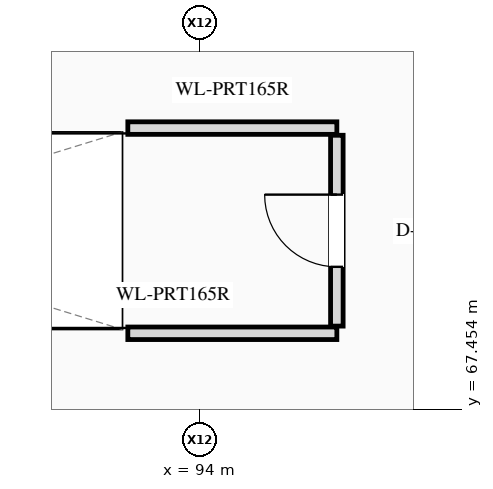
"""IFC4 building model, lengths in metres.
Left out: names, types, materials, properties, quantities, classifications, styles, units other than length and angle.
Written with IfcOpenShell. Run it as: python <this file> out.ifc"""

import sys

from ifc_helpers import new_model, si_unit, direction, frame, frame_2d, origin, place, context, subcontext, project, spatial, rectangle, extrude, element, fill, save


model = new_model("IFC4")
c1 = context("Model", 3, precision=1e-05, world=origin(), true_north=direction((0.0, 1.0)))
c2 = subcontext(c1, "Body", "Model", "MODEL_VIEW")
j1 = project(units=[si_unit("LENGTHUNIT", "METRE"), si_unit("PLANEANGLEUNIT", "RADIAN")], contexts=[c1])
p1 = place(None, origin())
s1 = spatial("IfcSite", under=j1, at=p1, CompositionType="ELEMENT")
p2 = place(p1, origin())
s2 = spatial("IfcBuilding", under=s1, at=p2, CompositionType="ELEMENT")
p3 = place(p2, frame((0.0, 0.0, 15.6)))
s3 = spatial("IfcBuildingStorey", under=s2, at=p3, CompositionType="ELEMENT", Elevation=15.6)
for number, where, z_axis, x_axis in (
    (1, (93.05, 68.45, 0.0), (0.0, 0.0, 1.0), (1.0, 0.0, 0.0)),
    (2, (93.05, 71.15, 0.0), (0.0, 0.0, 1.0), (1.0, 0.0, 0.0)),
):
    element("IfcWall", number, at=place(p3, frame(where, z_axis=z_axis, x_axis=x_axis)), inside=s3, PredefinedType="PARTITIONING", context=c2, shape_type="SweptSolid", body=[
        extrude(rectangle(XDim=2.75, YDim=0.165, at=frame_2d((1.375, 0.0))), origin(), (0.0, 0.0, 1.0), 3.074),
    ])
p4 = place(p3, frame((95.8, 68.544, 0.0), z_axis=(0.0, 0.0, 1.0), x_axis=(0.0, 1.0, 0.0)))
e3 = element("IfcWall", 3, at=p4, inside=s3, PredefinedType="PARTITIONING", context=c2, shape_type="SweptSolid", body=[
    extrude(rectangle(XDim=2.511, YDim=0.165, at=frame_2d((1.255, 0.0))), origin(), (0.0, 0.0, 1.0), 3.208),
])
p5 = place(p4, frame((0.78, 0.0, 0.0)))
e4 = element("IfcOpeningElement", 4, at=p5, cuts=e3, PredefinedType="OPENING", context=c2, shape_type="SweptSolid", body=[
    extrude(rectangle(XDim=0.95, YDim=2.15, at=frame_2d((0.475, 1.075))), frame((0.0, 0.093, 0.0), z_axis=(0.0, -1.0, 0.0), x_axis=(1.0, 0.0, 0.0)), (0.0, 0.0, 1.0), 0.185),
])
p6 = place(p5, origin())
e5 = element("IfcDoor", 5, at=p6, inside=s3, OperationType="SINGLE_SWING_RIGHT", PredefinedType="DOOR", context=c2, shape_type="SweptSolid", body=[
    extrude(rectangle(XDim=0.95, YDim=2.15, at=frame_2d((0.475, 1.075))), frame((0.0, 0.025, 0.0), z_axis=(0.0, -1.0, 0.0), x_axis=(1.0, 0.0, 0.0)), (0.0, 0.0, 1.0), 0.05),
])
fill(e4, e5)
save(model, sys.argv[1])
